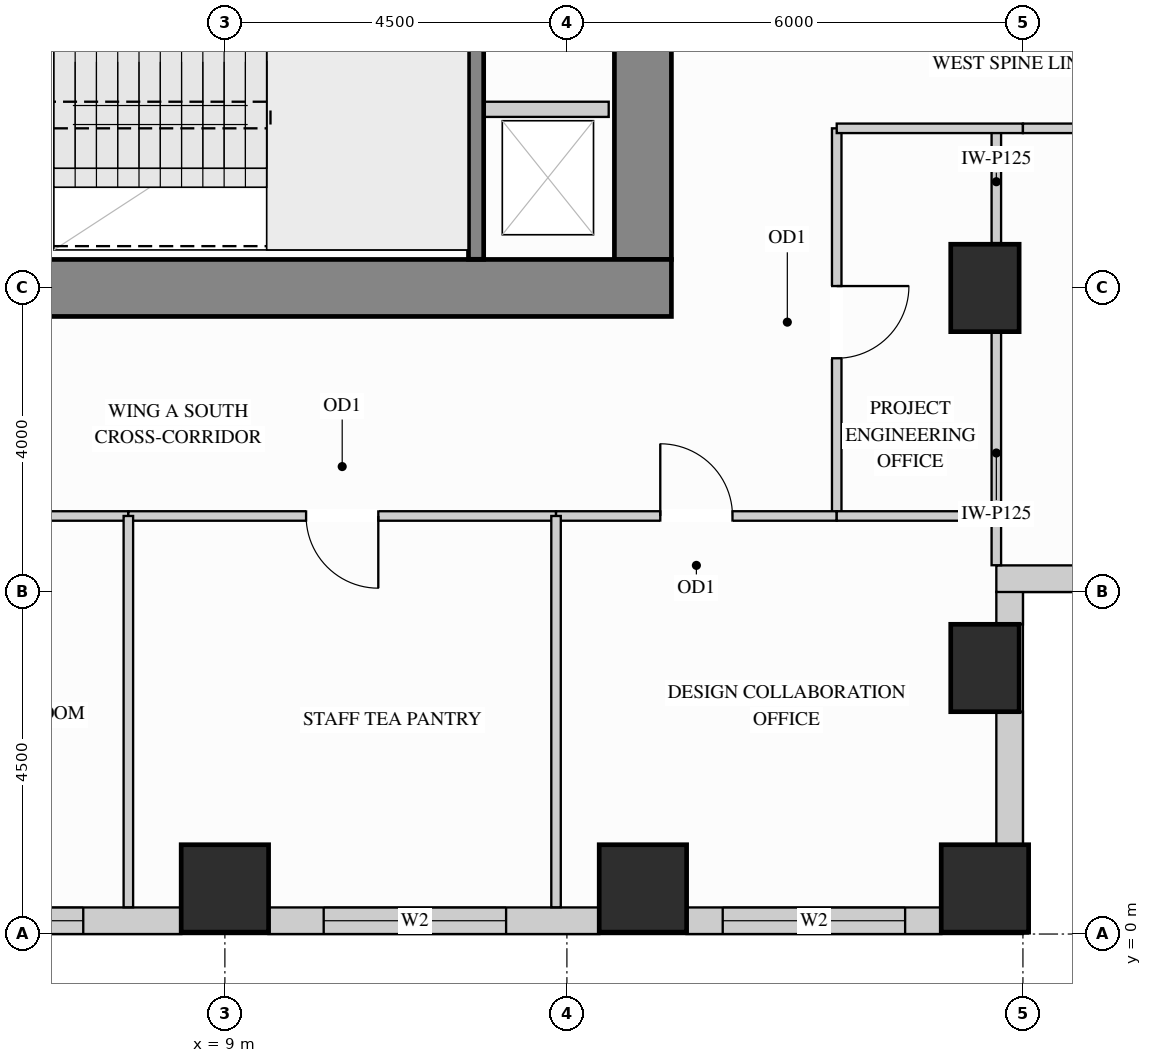
"""IFC4 building model, lengths in metres.
Left out: names, types, materials, properties, quantities, classifications, styles, units other than length and angle.
Written with IfcOpenShell. Run it as: python <this file> out.ifc"""

import sys

from ifc_helpers import new_model, si_unit, direction, frame, frame_2d, origin, origin_2d, place, context, subcontext, project, spatial, rectangle, extrude, source, transform, mapped, element, fill, save


model = new_model("IFC4")
c1 = context("Model", 3, precision=1e-05, world=origin(), true_north=direction((0.0, 1.0)))
c2 = subcontext(c1, "Body", "Model", "MODEL_VIEW")
j1 = project(units=[si_unit("LENGTHUNIT", "METRE"), si_unit("PLANEANGLEUNIT", "RADIAN")], contexts=[c1])
p1 = place(None, origin())
s1 = spatial("IfcSite", under=j1, at=p1, CompositionType="ELEMENT")
p2 = place(p1, origin())
s2 = spatial("IfcBuilding", under=s1, at=p2, CompositionType="ELEMENT")
p3 = place(p2, frame((0.0, 0.0, 81.0)))
s3 = spatial("IfcBuildingStorey", under=s2, at=p3, CompositionType="ELEMENT", Elevation=81.0)
m1 = source(origin(), c2, "Body", "SweptSolid", [
    extrude(rectangle(XDim=0.9, YDim=1.15, at=origin_2d()), origin(), (0.0, 0.0, 1.0), 3.38),
])
for number, where, z_axis, x_axis in (
    (1, (19.0, 3.5, 0.0), (0.0, 0.0, 1.0), (1.0, 0.0, 0.0)),
    (2, (19.0, 8.5, 0.0), (0.0, 0.0, 1.0), (1.0, 0.0, 0.0)),
):
    element("IfcColumn", number, at=place(p3, frame(where, z_axis=z_axis, x_axis=x_axis)), inside=s3, PredefinedType="COLUMN", context=c2, shape_type="MappedRepresentation", body=[
        mapped(m1, transform((0.0, 0.0, 0.0), x_axis=(1.0, 0.0, 0.0), y_axis=(0.0, 1.0, 0.0), z_axis=(0.0, 0.0, 1.0))),
    ])
m2 = source(origin(), c2, "Body", "SweptSolid", [
    extrude(rectangle(XDim=1.15, YDim=1.15, at=origin_2d()), origin(), (0.0, 0.0, 1.0), 3.38),
])
for number, where, z_axis, x_axis in (
    (3, (14.5, 0.6, 0.0), (0.0, 0.0, 1.0), (1.0, 0.0, 0.0)),
    (4, (19.0, 0.6, 0.0), (0.0, 0.0, 1.0), (1.0, 0.0, 0.0)),
    (5, (9.0, 0.6, 0.0), (0.0, 0.0, 1.0), (1.0, 0.0, 0.0)),
):
    element("IfcColumn", number, at=place(p3, frame(where, z_axis=z_axis, x_axis=x_axis)), inside=s3, PredefinedType="COLUMN", context=c2, shape_type="MappedRepresentation", body=[
        mapped(m2, transform((0.0, 0.0, 0.0), x_axis=(1.0, 0.0, 0.0), y_axis=(0.0, 1.0, 0.0), z_axis=(0.0, 0.0, 1.0))),
    ])
m3 = source(origin(), c2, "Body", "SweptSolid", [
    extrude(rectangle(XDim=9.945, YDim=0.75, at=frame_2d((4.973, 0.0))), origin(), (0.0, 0.0, 1.0), 3.38),
])
p4 = place(p3, frame((14.5, 8.875, 0.0), z_axis=(0.0, 0.0, 1.0), x_axis=(0.0, 1.0, 0.0)))
e6 = element("IfcWall", 6, at=p4, inside=s3, PredefinedType="SHEAR", context=c2, shape_type="MappedRepresentation", body=[
    mapped(m3, transform((0.0, 0.0, 0.0), x_axis=(1.0, 0.0, 0.0), y_axis=(0.0, 1.0, 0.0), z_axis=(0.0, 0.0, 1.0))),
])
m4 = source(origin(), c2, "Body", "SweptSolid", [
    extrude(rectangle(XDim=10.75, YDim=0.75, at=frame_2d((5.375, 0.0))), origin(), (0.0, 0.0, 1.0), 3.38),
])
p5 = place(p3, frame((4.125, 8.5, 0.0), z_axis=(0.0, 0.0, 1.0), x_axis=(1.0, 0.0, 0.0)))
e7 = element("IfcWall", 7, at=p5, inside=s3, PredefinedType="SHEAR", context=c2, shape_type="MappedRepresentation", body=[
    mapped(m4, transform((0.0, 0.0, 0.0), x_axis=(1.0, 0.0, 0.0), y_axis=(0.0, 1.0, 0.0), z_axis=(0.0, 0.0, 1.0))),
])
p6 = place(p3, frame((4.073, 0.175, 0.0), z_axis=(0.0, 0.0, 1.0), x_axis=(1.0, 0.0, 0.0)))
e8 = element("IfcWall", 8, at=p6, inside=s3, PredefinedType="SOLIDWALL", context=c2, shape_type="SweptSolid", body=[
    extrude(rectangle(XDim=4.354, YDim=0.35, at=frame_2d((2.177, 0.0))), origin(), (0.0, 0.0, 1.0), 3.365),
])
p7 = place(p6, frame((0.664, 0.0, 0.78)))
e9 = element("IfcOpeningElement", 9, at=p7, cuts=e8, PredefinedType="OPENING", context=c2, shape_type="SweptSolid", body=[
    extrude(rectangle(XDim=2.4, YDim=2.1, at=frame_2d((1.2, 1.05))), frame((0.0, 0.185, 0.0), z_axis=(0.0, -1.0, 0.0), x_axis=(1.0, 0.0, 0.0)), (0.0, 0.0, 1.0), 0.37),
])
p8 = place(p3, frame((9.573, 0.175, 0.0), z_axis=(0.0, 0.0, 1.0), x_axis=(1.0, 0.0, 0.0)))
e10 = element("IfcWall", 10, at=p8, inside=s3, PredefinedType="SOLIDWALL", context=c2, shape_type="SweptSolid", body=[
    extrude(rectangle(XDim=4.354, YDim=0.35, at=frame_2d((2.177, 0.0))), origin(), (0.0, 0.0, 1.0), 3.365),
])
p9 = place(p8, frame((0.727, 0.0, 0.78)))
e11 = element("IfcOpeningElement", 11, at=p9, cuts=e10, PredefinedType="OPENING", context=c2, shape_type="SweptSolid", body=[
    extrude(rectangle(XDim=2.4, YDim=2.1, at=frame_2d((1.2, 1.05))), frame((0.0, 0.185, 0.0), z_axis=(0.0, -1.0, 0.0), x_axis=(1.0, 0.0, 0.0)), (0.0, 0.0, 1.0), 0.37),
])
p10 = place(p3, frame((15.073, 0.175, 0.0), z_axis=(0.0, 0.0, 1.0), x_axis=(1.0, 0.0, 0.0)))
e12 = element("IfcWall", 12, at=p10, inside=s3, PredefinedType="SOLIDWALL", context=c2, shape_type="SweptSolid", body=[
    extrude(rectangle(XDim=3.354, YDim=0.35, at=frame_2d((1.677, 0.0))), origin(), (0.0, 0.0, 1.0), 3.365),
])
p11 = place(p10, frame((0.477, 0.0, 0.78)))
e13 = element("IfcOpeningElement", 13, at=p11, cuts=e12, PredefinedType="OPENING", context=c2, shape_type="SweptSolid", body=[
    extrude(rectangle(XDim=2.4, YDim=2.1, at=frame_2d((1.2, 1.05))), frame((0.0, 0.185, 0.0), z_axis=(0.0, -1.0, 0.0), x_axis=(1.0, 0.0, 0.0)), (0.0, 0.0, 1.0), 0.37),
])
m5 = source(origin(), c2, "Body", "SweptSolid", [
    extrude(rectangle(XDim=1.754, YDim=0.35, at=frame_2d((0.877, 0.0))), origin(), (0.0, 0.0, 1.0), 2.519),
])
p12 = place(p3, frame((19.325, 1.173, 0.0), z_axis=(0.0, 0.0, 1.0), x_axis=(0.0, 1.0, 0.0)))
e14 = element("IfcWall", 14, at=p12, inside=s3, PredefinedType="SOLIDWALL", context=c2, shape_type="MappedRepresentation", body=[
    mapped(m5, transform((0.0, 0.0, 0.0), x_axis=(1.0, 0.0, 0.0), y_axis=(0.0, 1.0, 0.0), z_axis=(0.0, 0.0, 1.0))),
])
m6 = source(origin(), c2, "Body", "SweptSolid", [
    extrude(rectangle(XDim=0.429, YDim=0.35, at=frame_2d((0.214, 0.0))), origin(), (0.0, 0.0, 1.0), 2.677),
])
p13 = place(p3, frame((19.325, 4.073, 0.0), z_axis=(0.0, 0.0, 1.0), x_axis=(0.0, 1.0, 0.0)))
e15 = element("IfcWall", 15, at=p13, inside=s3, PredefinedType="SOLIDWALL", context=c2, shape_type="MappedRepresentation", body=[
    mapped(m6, transform((0.0, 0.0, 0.0), x_axis=(1.0, 0.0, 0.0), y_axis=(0.0, 1.0, 0.0), z_axis=(0.0, 0.0, 1.0))),
])
p14 = place(p3, frame((19.15, 4.675, 0.0), z_axis=(0.0, 0.0, 1.0), x_axis=(1.0, 0.0, 0.0)))
e16 = element("IfcWall", 16, at=p14, inside=s3, PredefinedType="SOLIDWALL", context=c2, shape_type="SweptSolid", body=[
    extrude(rectangle(XDim=15.6, YDim=0.35, at=frame_2d((7.8, 0.0))), origin(), (0.0, 0.0, 1.0), 3.365),
])
p15 = place(p14, frame((4.307, 0.0, 0.78)))
e17 = element("IfcOpeningElement", 17, at=p15, cuts=e16, PredefinedType="OPENING", context=c2, shape_type="SweptSolid", body=[
    extrude(rectangle(XDim=1.5, YDim=2.0, at=frame_2d((0.75, 1.0))), frame((0.0, 0.185, 0.0), z_axis=(0.0, -1.0, 0.0), x_axis=(1.0, 0.0, 0.0)), (0.0, 0.0, 1.0), 0.37),
])
p16 = place(p14, frame((9.793, 0.0, 0.78)))
e18 = element("IfcOpeningElement", 18, at=p16, cuts=e16, PredefinedType="OPENING", context=c2, shape_type="SweptSolid", body=[
    extrude(rectangle(XDim=1.5, YDim=2.0, at=frame_2d((0.75, 1.0))), frame((0.0, 0.185, 0.0), z_axis=(0.0, -1.0, 0.0), x_axis=(1.0, 0.0, 0.0)), (0.0, 0.0, 1.0), 0.37),
])
m7 = source(origin(), c2, "Body", "SweptSolid", [
    extrude(rectangle(XDim=3.058, YDim=0.125, at=frame_2d((1.529, 0.0))), origin(), (0.0, 0.0, 1.0), 2.677),
])
p17 = place(p3, frame((19.15, 4.852, 0.0), z_axis=(0.0, 0.0, 1.0), x_axis=(0.0, 1.0, 0.0)))
e19 = element("IfcWall", 19, at=p17, inside=s3, PredefinedType="PARTITIONING", context=c2, shape_type="MappedRepresentation", body=[
    mapped(m7, transform((0.0, 0.0, 0.0), x_axis=(1.0, 0.0, 0.0), y_axis=(0.0, 1.0, 0.0), z_axis=(0.0, 0.0, 1.0))),
])
m8 = source(origin(), c2, "Body", "SweptSolid", [
    extrude(rectangle(XDim=1.51, YDim=0.125, at=frame_2d((0.755, 0.0))), origin(), (0.0, 0.0, 1.0), 2.677),
])
p18 = place(p3, frame((19.15, 9.09, 0.0), z_axis=(0.0, 0.0, 1.0), x_axis=(0.0, 1.0, 0.0)))
e20 = element("IfcWall", 20, at=p18, inside=s3, PredefinedType="PARTITIONING", context=c2, shape_type="MappedRepresentation", body=[
    mapped(m8, transform((0.0, 0.0, 0.0), x_axis=(1.0, 0.0, 0.0), y_axis=(0.0, 1.0, 0.0), z_axis=(0.0, 0.0, 1.0))),
])
p19 = place(p3, frame((17.05, 5.5, 0.0), z_axis=(0.0, 0.0, 1.0), x_axis=(0.0, 1.0, 0.0)))
e21 = element("IfcWall", 21, at=p19, inside=s3, PredefinedType="PARTITIONING", context=c2, shape_type="SweptSolid", body=[
    extrude(rectangle(XDim=5.1, YDim=0.125, at=frame_2d((2.55, 0.0))), origin(), (0.0, 0.0, 1.0), 3.365),
])
p20 = place(p19, frame((2.075, 0.0, 0.0)))
e22 = element("IfcOpeningElement", 22, at=p20, cuts=e21, PredefinedType="OPENING", context=c2, shape_type="SweptSolid", body=[
    extrude(rectangle(XDim=0.95, YDim=2.15, at=frame_2d((0.475, 1.075))), frame((0.0, 0.073, 0.0), z_axis=(0.0, -1.0, 0.0), x_axis=(1.0, 0.0, 0.0)), (0.0, 0.0, 1.0), 0.145),
])
m9 = source(origin(), c2, "Body", "SweptSolid", [
    extrude(rectangle(XDim=2.45, YDim=0.125, at=frame_2d((1.225, 0.0))), origin(), (0.0, 0.0, 1.0), 3.365),
])
p21 = place(p3, frame((17.05, 10.6, 0.0), z_axis=(0.0, 0.0, 1.0), x_axis=(1.0, 0.0, 0.0)))
e23 = element("IfcWall", 23, at=p21, inside=s3, PredefinedType="PARTITIONING", context=c2, shape_type="MappedRepresentation", body=[
    mapped(m9, transform((0.0, 0.0, 0.0), x_axis=(1.0, 0.0, 0.0), y_axis=(0.0, 1.0, 0.0), z_axis=(0.0, 0.0, 1.0))),
])
p22 = place(p3, frame((19.5, 10.6, 0.0), z_axis=(0.0, 0.0, 1.0), x_axis=(1.0, 0.0, 0.0)))
e24 = element("IfcWall", 24, at=p22, inside=s3, PredefinedType="PARTITIONING", context=c2, shape_type="SweptSolid", body=[
    extrude(rectangle(XDim=14.9, YDim=0.125, at=frame_2d((7.45, 0.0))), origin(), (0.0, 0.0, 1.0), 3.365),
])
p23 = place(p22, frame((6.975, 0.0, 0.0)))
e25 = element("IfcOpeningElement", 25, at=p23, cuts=e24, PredefinedType="OPENING", context=c2, shape_type="SweptSolid", body=[
    extrude(rectangle(XDim=0.95, YDim=2.15, at=frame_2d((0.475, 1.075))), frame((0.0, 0.073, 0.0), z_axis=(0.0, -1.0, 0.0), x_axis=(1.0, 0.0, 0.0)), (0.0, 0.0, 1.0), 0.145),
])
p24 = place(p3, frame((2.45, 5.5, 0.0), z_axis=(0.0, 0.0, 1.0), x_axis=(1.0, 0.0, 0.0)))
e26 = element("IfcWall", 26, at=p24, inside=s3, PredefinedType="PARTITIONING", context=c2, shape_type="SweptSolid", body=[
    extrude(rectangle(XDim=5.28, YDim=0.125, at=frame_2d((2.64, 0.0))), origin(), (0.0, 0.0, 1.0), 3.365),
])
p25 = place(p24, frame((2.165, 0.0, 0.0)))
e27 = element("IfcOpeningElement", 27, at=p25, cuts=e26, PredefinedType="OPENING", context=c2, shape_type="SweptSolid", body=[
    extrude(rectangle(XDim=0.95, YDim=2.15, at=frame_2d((0.475, 1.075))), frame((0.0, 0.073, 0.0), z_axis=(0.0, -1.0, 0.0), x_axis=(1.0, 0.0, 0.0)), (0.0, 0.0, 1.0), 0.145),
])
p26 = place(p3, frame((7.73, 5.5, 0.0), z_axis=(0.0, 0.0, 1.0), x_axis=(1.0, 0.0, 0.0)))
e28 = element("IfcWall", 28, at=p26, inside=s3, PredefinedType="PARTITIONING", context=c2, shape_type="SweptSolid", body=[
    extrude(rectangle(XDim=5.627, YDim=0.125, at=frame_2d((2.813, 0.0))), origin(), (0.0, 0.0, 1.0), 3.365),
])
p27 = place(p26, frame((2.338, 0.0, 0.0)))
e29 = element("IfcOpeningElement", 29, at=p27, cuts=e28, PredefinedType="OPENING", context=c2, shape_type="SweptSolid", body=[
    extrude(rectangle(XDim=0.95, YDim=2.15, at=frame_2d((0.475, 1.075))), frame((0.0, 0.073, 0.0), z_axis=(0.0, -1.0, 0.0), x_axis=(1.0, 0.0, 0.0)), (0.0, 0.0, 1.0), 0.145),
])
p28 = place(p3, frame((13.357, 5.5, 0.0), z_axis=(0.0, 0.0, 1.0), x_axis=(1.0, 0.0, 0.0)))
e30 = element("IfcWall", 30, at=p28, inside=s3, PredefinedType="PARTITIONING", context=c2, shape_type="SweptSolid", body=[
    extrude(rectangle(XDim=3.693, YDim=0.125, at=frame_2d((1.847, 0.0))), origin(), (0.0, 0.0, 1.0), 3.365),
])
p29 = place(p28, frame((1.372, 0.0, 0.0)))
e31 = element("IfcOpeningElement", 31, at=p29, cuts=e30, PredefinedType="OPENING", context=c2, shape_type="SweptSolid", body=[
    extrude(rectangle(XDim=0.95, YDim=2.15, at=frame_2d((0.475, 1.075))), frame((0.0, 0.073, 0.0), z_axis=(0.0, -1.0, 0.0), x_axis=(1.0, 0.0, 0.0)), (0.0, 0.0, 1.0), 0.145),
])
m10 = source(origin(), c2, "Body", "SweptSolid", [
    extrude(rectangle(XDim=2.1, YDim=0.125, at=frame_2d((1.05, 0.0))), origin(), (0.0, 0.0, 1.0), 3.365),
])
p30 = place(p3, frame((17.05, 5.5, 0.0), z_axis=(0.0, 0.0, 1.0), x_axis=(1.0, 0.0, 0.0)))
e32 = element("IfcWall", 32, at=p30, inside=s3, PredefinedType="PARTITIONING", context=c2, shape_type="MappedRepresentation", body=[
    mapped(m10, transform((0.0, 0.0, 0.0), x_axis=(1.0, 0.0, 0.0), y_axis=(0.0, 1.0, 0.0), z_axis=(0.0, 0.0, 1.0))),
])
m11 = source(origin(), c2, "Body", "SweptSolid", [
    extrude(rectangle(XDim=5.148, YDim=0.125, at=frame_2d((2.574, 0.0))), origin(), (0.0, 0.0, 1.0), 3.365),
])
for number, where, z_axis, x_axis in (
    (33, (7.73, 0.352, 0.0), (0.0, 0.0, 1.0), (0.0, 1.0, 0.0)),
    (34, (13.357, 0.352, 0.0), (0.0, 0.0, 1.0), (0.0, 1.0, 0.0)),
):
    element("IfcWall", number, at=place(p3, frame(where, z_axis=z_axis, x_axis=x_axis)), inside=s3, PredefinedType="PARTITIONING", context=c2, shape_type="MappedRepresentation", body=[
        mapped(m11, transform((0.0, 0.0, 0.0), x_axis=(1.0, 0.0, 0.0), y_axis=(0.0, 1.0, 0.0), z_axis=(0.0, 0.0, 1.0))),
    ])
m12 = source(origin(), c2, "Body", "SweptSolid", [
    extrude(rectangle(XDim=1.63, YDim=0.2, at=frame_2d((0.815, 0.0))), origin(), (0.0, 0.0, 1.0), 3.365),
])
p31 = place(p3, frame((12.42, 10.85, 0.0), z_axis=(0.0, 0.0, 1.0), x_axis=(1.0, 0.0, 0.0)))
e35 = element("IfcWall", 35, at=p31, inside=s3, PredefinedType="PARTITIONING", context=c2, shape_type="MappedRepresentation", body=[
    mapped(m12, transform((0.0, 0.0, 0.0), x_axis=(1.0, 0.0, 0.0), y_axis=(0.0, 1.0, 0.0), z_axis=(0.0, 0.0, 1.0))),
])
m13 = source(origin(), c2, "Body", "SweptSolid", [
    extrude(rectangle(XDim=3.678, YDim=0.2, at=frame_2d((1.839, 0.0))), origin(), (0.0, 0.0, 1.0), 3.38),
])
p32 = place(p3, frame((12.305, 8.877, 0.0), z_axis=(0.0, 0.0, 1.0), x_axis=(0.0, 1.0, 0.0)))
e36 = element("IfcWall", 36, at=p32, inside=s3, PredefinedType="SHEAR", context=c2, shape_type="MappedRepresentation", body=[
    mapped(m13, transform((0.0, 0.0, 0.0), x_axis=(1.0, 0.0, 0.0), y_axis=(0.0, 1.0, 0.0), z_axis=(0.0, 0.0, 1.0))),
])
m14 = source(origin(), c2, "Body", "SweptSolid", [
    extrude(rectangle(XDim=0.95, YDim=2.15, at=frame_2d((0.475, 1.075))), frame((0.0, 0.025, 0.0), z_axis=(0.0, -1.0, 0.0), x_axis=(1.0, 0.0, 0.0)), (0.0, 0.0, 1.0), 0.05),
])
p33 = place(p20, origin())
e37 = element("IfcDoor", 37, at=p33, inside=s3, OperationType="SINGLE_SWING_RIGHT", PredefinedType="DOOR", context=c2, shape_type="MappedRepresentation", body=[
    mapped(m14, transform((0.0, 0.0, 0.0), x_axis=(1.0, 0.0, 0.0), y_axis=(0.0, 1.0, 0.0), z_axis=(0.0, 0.0, 1.0))),
])
fill(e22, e37)
p34 = place(p27, origin())
e38 = element("IfcDoor", 38, at=p34, inside=s3, OperationType="SINGLE_SWING_RIGHT", PredefinedType="DOOR", context=c2, shape_type="MappedRepresentation", body=[
    mapped(m14, transform((0.0, 0.0, 0.0), x_axis=(1.0, 0.0, 0.0), y_axis=(0.0, 1.0, 0.0), z_axis=(0.0, 0.0, 1.0))),
])
fill(e29, e38)
p35 = place(p29, origin())
e39 = element("IfcDoor", 39, at=p35, inside=s3, OperationType="SINGLE_SWING_LEFT", PredefinedType="DOOR", context=c2, shape_type="MappedRepresentation", body=[
    mapped(m14, transform((0.0, 0.0, 0.0), x_axis=(1.0, 0.0, 0.0), y_axis=(0.0, 1.0, 0.0), z_axis=(0.0, 0.0, 1.0))),
])
fill(e31, e39)
m15 = source(origin(), c2, "Body", "SweptSolid", [
    extrude(rectangle(XDim=2.4, YDim=2.1, at=frame_2d((1.2, 1.05))), frame((0.0, 0.03, 0.0), z_axis=(0.0, -1.0, 0.0), x_axis=(1.0, 0.0, 0.0)), (0.0, 0.0, 1.0), 0.06),
])
p36 = place(p7, origin())
e40 = element("IfcWindow", 40, at=p36, inside=s3, PartitioningType="SINGLE_PANEL", PredefinedType="WINDOW", context=c2, shape_type="MappedRepresentation", body=[
    mapped(m15, transform((0.0, 0.0, 0.0), x_axis=(1.0, 0.0, 0.0), y_axis=(0.0, 1.0, 0.0), z_axis=(0.0, 0.0, 1.0))),
])
fill(e9, e40)
p37 = place(p9, origin())
e41 = element("IfcWindow", 41, at=p37, inside=s3, PartitioningType="SINGLE_PANEL", PredefinedType="WINDOW", context=c2, shape_type="MappedRepresentation", body=[
    mapped(m15, transform((0.0, 0.0, 0.0), x_axis=(1.0, 0.0, 0.0), y_axis=(0.0, 1.0, 0.0), z_axis=(0.0, 0.0, 1.0))),
])
fill(e11, e41)
p38 = place(p11, origin())
e42 = element("IfcWindow", 42, at=p38, inside=s3, PartitioningType="SINGLE_PANEL", PredefinedType="WINDOW", context=c2, shape_type="MappedRepresentation", body=[
    mapped(m15, transform((0.0, 0.0, 0.0), x_axis=(1.0, 0.0, 0.0), y_axis=(0.0, 1.0, 0.0), z_axis=(0.0, 0.0, 1.0))),
])
fill(e13, e42)
save(model, sys.argv[1])
